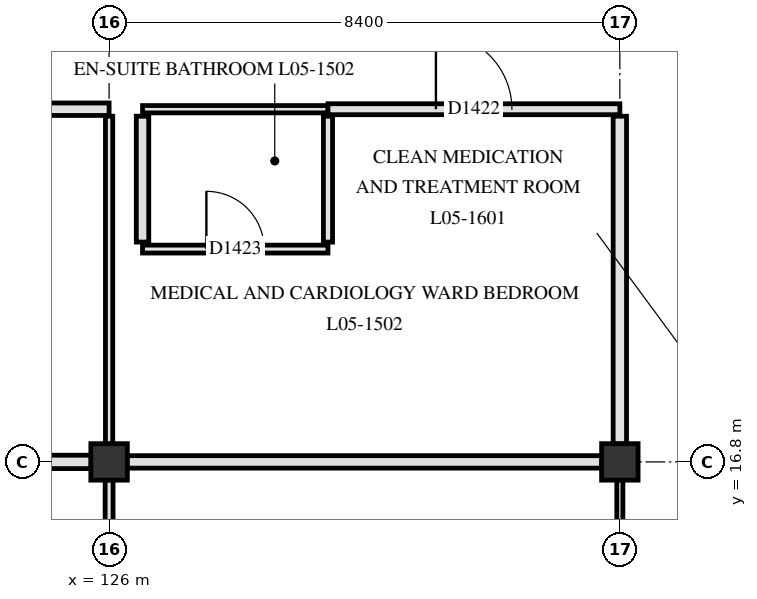
"""IFC4 building model, lengths in metres.
Left out: names, types, materials, properties, quantities, classifications, styles, units other than length and angle.
Written with IfcOpenShell. Run it as: python <this file> out.ifc"""

import sys

from ifc_helpers import new_model, si_unit, direction, frame, frame_2d, origin, origin_2d, place, context, subcontext, project, spatial, rectangle, extrude, element, fill, save


model = new_model("IFC4")
c1 = context("Model", 3, precision=1e-05, world=origin(), true_north=direction((0.0, 1.0)))
c2 = subcontext(c1, "Body", "Model", "MODEL_VIEW")
j1 = project(units=[si_unit("LENGTHUNIT", "METRE"), si_unit("PLANEANGLEUNIT", "RADIAN")], contexts=[c1])
p1 = place(None, origin())
s1 = spatial("IfcSite", under=j1, at=p1, CompositionType="ELEMENT")
p2 = place(p1, origin())
s2 = spatial("IfcBuilding", under=s1, at=p2, CompositionType="ELEMENT")
p3 = place(p2, frame((0.0, 0.0, 22.5)))
s3 = spatial("IfcBuildingStorey", under=s2, at=p3, CompositionType="ELEMENT", Elevation=22.5)
for number, where, z_axis, x_axis in (
    (1, (126.0, 16.8, 0.0), (0.0, 0.0, 1.0), (1.0, 0.0, 0.0)),
    (2, (134.4, 16.8, 0.0), (0.0, 0.0, 1.0), (1.0, 0.0, 0.0)),
):
    element("IfcColumn", number, at=place(p3, frame(where, z_axis=z_axis, x_axis=x_axis)), inside=s3, PredefinedType="COLUMN", context=c2, shape_type="SweptSolid", body=[
        extrude(rectangle(XDim=0.6, YDim=0.6, at=origin_2d()), origin(), (0.0, 0.0, 1.0), 3.9),
    ])
p4 = place(p3, frame((117.895, 16.8, 0.0), z_axis=(0.0, 0.0, 1.0), x_axis=(1.0, 0.0, 0.0)))
e3 = element("IfcWall", 3, at=p4, inside=s3, PredefinedType="PARTITIONING", context=c2, shape_type="SweptSolid", body=[
    extrude(rectangle(XDim=7.81, YDim=0.22, at=frame_2d((3.905, 0.0))), origin(), (0.0, 0.0, 1.0), 3.16),
])
p5 = place(p3, frame((126.295, 16.8, 0.0), z_axis=(0.0, 0.0, 1.0), x_axis=(1.0, 0.0, 0.0)))
e4 = element("IfcWall", 4, at=p5, inside=s3, PredefinedType="PARTITIONING", context=c2, shape_type="SweptSolid", body=[
    extrude(rectangle(XDim=7.81, YDim=0.205, at=frame_2d((3.905, 0.0))), origin(), (0.0, 0.0, 1.0), 3.16),
])
p6 = place(p3, frame((126.55, 20.3, 0.0), z_axis=(0.0, 0.0, 1.0), x_axis=(1.0, 0.0, 0.0)))
e5 = element("IfcWall", 5, at=p6, inside=s3, PredefinedType="PARTITIONING", context=c2, shape_type="SweptSolid", body=[
    extrude(rectangle(XDim=3.05, YDim=0.13, at=frame_2d((1.525, 0.0))), origin(), (0.0, 0.0, 1.0), 3.61),
])
p7 = place(p6, frame((1.05, 0.0, 0.0)))
e6 = element("IfcOpeningElement", 6, at=p7, cuts=e5, PredefinedType="OPENING", context=c2, shape_type="SweptSolid", body=[
    extrude(rectangle(XDim=0.95, YDim=2.1, at=frame_2d((0.475, 1.05))), frame((0.0, 0.075, 0.0), z_axis=(0.0, -1.0, 0.0), x_axis=(1.0, 0.0, 0.0)), (0.0, 0.0, 1.0), 0.15),
])
p8 = place(p3, frame((121.2, 22.6, 0.0), z_axis=(0.0, 0.0, 1.0), x_axis=(1.0, 0.0, 0.0)))
e7 = element("IfcWall", 7, at=p8, inside=s3, PredefinedType="PARTITIONING", context=c2, shape_type="SweptSolid", body=[
    extrude(rectangle(XDim=4.8, YDim=0.205, at=frame_2d((2.4, 0.0))), origin(), (0.0, 0.0, 1.0), 3.3),
])
p9 = place(p8, frame((1.55, 0.0, 0.0)))
e8 = element("IfcOpeningElement", 8, at=p9, cuts=e7, PredefinedType="OPENING", context=c2, shape_type="SweptSolid", body=[
    extrude(rectangle(XDim=1.7, YDim=2.25, at=frame_2d((0.85, 1.125))), frame((0.0, 0.113, 0.0), z_axis=(0.0, -1.0, 0.0), x_axis=(1.0, 0.0, 0.0)), (0.0, 0.0, 1.0), 0.225),
])
p10 = place(p3, frame((126.55, 22.6, 0.0), z_axis=(0.0, 0.0, 1.0), x_axis=(1.0, 0.0, 0.0)))
e9 = element("IfcWall", 9, at=p10, inside=s3, PredefinedType="PARTITIONING", context=c2, shape_type="SweptSolid", body=[
    extrude(rectangle(XDim=3.05, YDim=0.12, at=frame_2d((1.525, 0.0))), origin(), (0.0, 0.0, 1.0), 3.61),
])
p11 = place(p3, frame((129.6, 22.6, 0.0), z_axis=(0.0, 0.0, 1.0), x_axis=(1.0, 0.0, 0.0)))
e10 = element("IfcWall", 10, at=p11, inside=s3, PredefinedType="PARTITIONING", context=c2, shape_type="SweptSolid", body=[
    extrude(rectangle(XDim=4.8, YDim=0.18, at=frame_2d((2.4, 0.0))), origin(), (0.0, 0.0, 1.0), 3.3),
])
p12 = place(p11, frame((1.775, 0.0, 0.0)))
e11 = element("IfcOpeningElement", 11, at=p12, cuts=e10, PredefinedType="OPENING", context=c2, shape_type="SweptSolid", body=[
    extrude(rectangle(XDim=1.25, YDim=2.2, at=frame_2d((0.625, 1.1))), frame((0.0, 0.1, 0.0), z_axis=(0.0, -1.0, 0.0), x_axis=(1.0, 0.0, 0.0)), (0.0, 0.0, 1.0), 0.2),
])
p13 = place(p3, frame((126.0, 11.115, 0.0), z_axis=(0.0, 0.0, 1.0), x_axis=(0.0, 1.0, 0.0)))
e12 = element("IfcWall", 12, at=p13, inside=s3, PredefinedType="PARTITIONING", context=c2, shape_type="SweptSolid", body=[
    extrude(rectangle(XDim=5.39, YDim=0.13, at=frame_2d((2.695, 0.0))), origin(), (0.0, 0.0, 1.0), 3.3),
])
p14 = place(p3, frame((126.0, 17.095, 0.0), z_axis=(0.0, 0.0, 1.0), x_axis=(0.0, 1.0, 0.0)))
e13 = element("IfcWall", 13, at=p14, inside=s3, PredefinedType="PARTITIONING", context=c2, shape_type="SweptSolid", body=[
    extrude(rectangle(XDim=5.39, YDim=0.12, at=frame_2d((2.695, 0.0))), origin(), (0.0, 0.0, 1.0), 3.3),
])
p15 = place(p3, frame((126.55, 20.415, 0.0), z_axis=(0.0, 0.0, 1.0), x_axis=(0.0, 1.0, 0.0)))
e14 = element("IfcWall", 14, at=p15, inside=s3, PredefinedType="PARTITIONING", context=c2, shape_type="SweptSolid", body=[
    extrude(rectangle(XDim=2.07, YDim=0.205, at=frame_2d((1.035, 0.0))), origin(), (0.0, 0.0, 1.0), 3.34),
])
p16 = place(p3, frame((129.6, 20.415, 0.0), z_axis=(0.0, 0.0, 1.0), x_axis=(0.0, 1.0, 0.0)))
e15 = element("IfcWall", 15, at=p16, inside=s3, PredefinedType="PARTITIONING", context=c2, shape_type="SweptSolid", body=[
    extrude(rectangle(XDim=2.07, YDim=0.15, at=frame_2d((1.035, 0.0))), origin(), (0.0, 0.0, 1.0), 3.34),
])
p17 = place(p3, frame((134.4, 11.115, 0.0), z_axis=(0.0, 0.0, 1.0), x_axis=(0.0, 1.0, 0.0)))
e16 = element("IfcWall", 16, at=p17, inside=s3, PredefinedType="PARTITIONING", context=c2, shape_type="SweptSolid", body=[
    extrude(rectangle(XDim=5.39, YDim=0.1, at=frame_2d((2.695, 0.0))), origin(), (0.0, 0.0, 1.0), 3.3),
])
p18 = place(p3, frame((134.4, 17.095, 0.0), z_axis=(0.0, 0.0, 1.0), x_axis=(0.0, 1.0, 0.0)))
e17 = element("IfcWall", 17, at=p18, inside=s3, PredefinedType="PARTITIONING", context=c2, shape_type="SweptSolid", body=[
    extrude(rectangle(XDim=5.39, YDim=0.22, at=frame_2d((2.695, 0.0))), origin(), (0.0, 0.0, 1.0), 3.3),
])
p19 = place(p12, origin())
e18 = element("IfcDoor", 18, at=p19, inside=s3, OperationType="SINGLE_SWING_LEFT", PredefinedType="DOOR", context=c2, shape_type="SweptSolid", body=[
    extrude(rectangle(XDim=1.25, YDim=2.2, at=frame_2d((0.625, 1.1))), frame((0.0, 0.025, 0.0), z_axis=(0.0, -1.0, 0.0), x_axis=(1.0, 0.0, 0.0)), (0.0, 0.0, 1.0), 0.05),
])
fill(e11, e18)
p20 = place(p7, origin())
e19 = element("IfcDoor", 19, at=p20, inside=s3, OperationType="SINGLE_SWING_LEFT", PredefinedType="DOOR", context=c2, shape_type="SweptSolid", body=[
    extrude(rectangle(XDim=0.95, YDim=2.1, at=frame_2d((0.475, 1.05))), frame((0.0, 0.025, 0.0), z_axis=(0.0, -1.0, 0.0), x_axis=(1.0, 0.0, 0.0)), (0.0, 0.0, 1.0), 0.05),
])
fill(e6, e19)
save(model, sys.argv[1])
